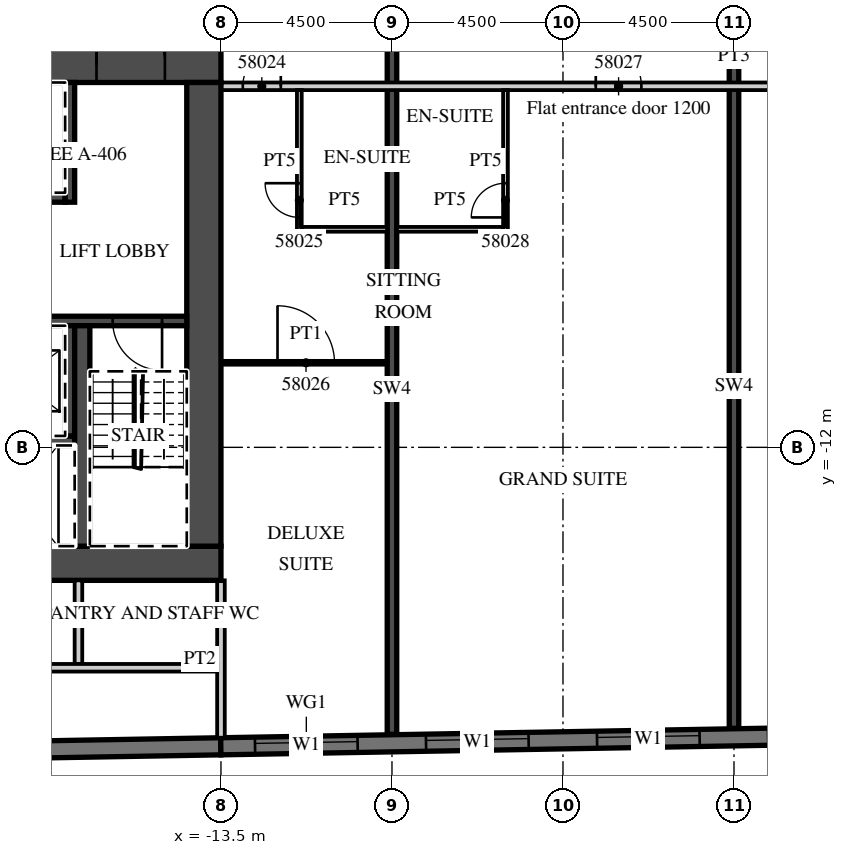
"""IFC4 building model, lengths in metres.
Left out: names, types, materials, properties, quantities, classifications, styles, units other than length and angle.
Written with IfcOpenShell. Run it as: python <this file> out.ifc"""

import sys

from ifc_helpers import new_model, si_unit, direction, frame, frame_2d, origin, place, context, subcontext, project, spatial, rectangle, extrude, element, fill, save


model = new_model("IFC4")
c1 = context("Model", 3, precision=1e-05, world=origin(), true_north=direction((0.0, 1.0)))
c2 = subcontext(c1, "Body", "Model", "MODEL_VIEW")
j1 = project(units=[si_unit("LENGTHUNIT", "METRE"), si_unit("PLANEANGLEUNIT", "RADIAN")], contexts=[c1])
p1 = place(None, origin())
s1 = spatial("IfcSite", under=j1, at=p1, CompositionType="ELEMENT")
p2 = place(p1, origin())
s2 = spatial("IfcBuilding", under=s1, at=p2, CompositionType="ELEMENT")
p3 = place(p2, frame((0.0, 0.0, 237.5)))
s3 = spatial("IfcBuildingStorey", under=s2, at=p3, CompositionType="ELEMENT", Elevation=237.5)
p4 = place(p3, frame((-9.0, -19.55, 0.0), z_axis=(0.0, 0.0, 1.0), x_axis=(0.0, 1.0, 0.0)))
e1 = element("IfcWall", 1, at=p4, inside=s3, PredefinedType="SHEAR", context=c2, shape_type="SweptSolid", body=[
    extrude(rectangle(XDim=18.15, YDim=0.25, at=frame_2d((9.075, 0.0))), origin(), (0.0, 0.0, 1.0), 3.3),
])
p5 = place(p3, frame((0.0, -19.393, 0.0), z_axis=(0.0, 0.0, 1.0), x_axis=(0.0, 1.0, 0.0)))
e2 = element("IfcWall", 2, at=p5, inside=s3, PredefinedType="SHEAR", context=c2, shape_type="SweptSolid", body=[
    extrude(rectangle(XDim=17.993, YDim=0.25, at=frame_2d((8.997, 0.0))), origin(), (0.0, 0.0, 1.0), 3.3),
])
p6 = place(p3, frame((-31.504, -20.18, 0.0), z_axis=(0.0, 0.0, 1.0), x_axis=(0.999847677887, 0.017453395744, 0.0)))
e3 = element("IfcWall", 3, at=p6, inside=s3, PredefinedType="SOLIDWALL", context=c2, shape_type="SweptSolid", body=[
    extrude(rectangle(XDim=18.003, YDim=0.45, at=frame_2d((9.001, 0.0))), origin(), (0.0, 0.0, 1.0), 3.02),
])
p7 = place(p3, frame((-13.504, -19.866, 0.0), z_axis=(0.0, 0.0, 1.0), x_axis=(0.999847672978, 0.017453676992, 0.0)))
e4 = element("IfcWall", 4, at=p7, inside=s3, PredefinedType="SOLIDWALL", context=c2, shape_type="SweptSolid", body=[
    extrude(rectangle(XDim=52.86, YDim=0.45, at=frame_2d((26.43, 0.0))), origin(), (0.0, 0.0, 1.0), 3.02),
])
p8 = place(p7, frame((0.9, 0.0, 0.45)))
e5 = element("IfcOpeningElement", 5, at=p8, cuts=e4, PredefinedType="OPENING", context=c2, shape_type="SweptSolid", body=[
    extrude(rectangle(XDim=2.7, YDim=2.25, at=frame_2d((1.35, 1.125))), frame((0.0, 0.235, 0.0), z_axis=(0.0, -1.0, 0.0), x_axis=(1.0, 0.0, 0.0)), (0.0, 0.0, 1.0), 0.47),
])
p9 = place(p7, frame((5.401, 0.0, 0.45)))
e6 = element("IfcOpeningElement", 6, at=p9, cuts=e4, PredefinedType="OPENING", context=c2, shape_type="SweptSolid", body=[
    extrude(rectangle(XDim=2.7, YDim=2.25, at=frame_2d((1.35, 1.125))), frame((0.0, 0.235, 0.0), z_axis=(0.0, -1.0, 0.0), x_axis=(1.0, 0.0, 0.0)), (0.0, 0.0, 1.0), 0.47),
])
p10 = place(p7, frame((9.902, 0.0, 0.45)))
e7 = element("IfcOpeningElement", 7, at=p10, cuts=e4, PredefinedType="OPENING", context=c2, shape_type="SweptSolid", body=[
    extrude(rectangle(XDim=2.7, YDim=2.25, at=frame_2d((1.35, 1.125))), frame((0.0, 0.235, 0.0), z_axis=(0.0, -1.0, 0.0), x_axis=(1.0, 0.0, 0.0)), (0.0, 0.0, 1.0), 0.47),
])
p11 = place(p7, frame((14.402, 0.0, 0.45)))
e8 = element("IfcOpeningElement", 8, at=p11, cuts=e4, PredefinedType="OPENING", context=c2, shape_type="SweptSolid", body=[
    extrude(rectangle(XDim=2.7, YDim=2.25, at=frame_2d((1.35, 1.125))), frame((0.0, 0.235, 0.0), z_axis=(0.0, -1.0, 0.0), x_axis=(1.0, 0.0, 0.0)), (0.0, 0.0, 1.0), 0.47),
])
p12 = place(p7, frame((18.903, 0.0, 0.45)))
e9 = element("IfcOpeningElement", 9, at=p12, cuts=e4, PredefinedType="OPENING", context=c2, shape_type="SweptSolid", body=[
    extrude(rectangle(XDim=2.7, YDim=2.25, at=frame_2d((1.35, 1.125))), frame((0.0, 0.235, 0.0), z_axis=(0.0, -1.0, 0.0), x_axis=(1.0, 0.0, 0.0)), (0.0, 0.0, 1.0), 0.47),
])
p13 = place(p7, frame((23.404, 0.0, 0.45)))
e10 = element("IfcOpeningElement", 10, at=p13, cuts=e4, PredefinedType="OPENING", context=c2, shape_type="SweptSolid", body=[
    extrude(rectangle(XDim=2.7, YDim=2.25, at=frame_2d((1.35, 1.125))), frame((0.0, 0.235, 0.0), z_axis=(0.0, -1.0, 0.0), x_axis=(1.0, 0.0, 0.0)), (0.0, 0.0, 1.0), 0.47),
])
p14 = place(p7, frame((27.904, 0.0, 0.45)))
e11 = element("IfcOpeningElement", 11, at=p14, cuts=e4, PredefinedType="OPENING", context=c2, shape_type="SweptSolid", body=[
    extrude(rectangle(XDim=2.7, YDim=2.25, at=frame_2d((1.35, 1.125))), frame((0.0, 0.235, 0.0), z_axis=(0.0, -1.0, 0.0), x_axis=(1.0, 0.0, 0.0)), (0.0, 0.0, 1.0), 0.47),
])
p15 = place(p7, frame((32.405, 0.0, 0.45)))
e12 = element("IfcOpeningElement", 12, at=p15, cuts=e4, PredefinedType="OPENING", context=c2, shape_type="SweptSolid", body=[
    extrude(rectangle(XDim=2.7, YDim=2.25, at=frame_2d((1.35, 1.125))), frame((0.0, 0.235, 0.0), z_axis=(0.0, -1.0, 0.0), x_axis=(1.0, 0.0, 0.0)), (0.0, 0.0, 1.0), 0.47),
])
p16 = place(p7, frame((36.906, 0.0, 0.45)))
e13 = element("IfcOpeningElement", 13, at=p16, cuts=e4, PredefinedType="OPENING", context=c2, shape_type="SweptSolid", body=[
    extrude(rectangle(XDim=2.7, YDim=2.25, at=frame_2d((1.35, 1.125))), frame((0.0, 0.235, 0.0), z_axis=(0.0, -1.0, 0.0), x_axis=(1.0, 0.0, 0.0)), (0.0, 0.0, 1.0), 0.47),
])
p17 = place(p7, frame((41.406, 0.0, 0.45)))
e14 = element("IfcOpeningElement", 14, at=p17, cuts=e4, PredefinedType="OPENING", context=c2, shape_type="SweptSolid", body=[
    extrude(rectangle(XDim=2.7, YDim=2.25, at=frame_2d((1.35, 1.125))), frame((0.0, 0.235, 0.0), z_axis=(0.0, -1.0, 0.0), x_axis=(1.0, 0.0, 0.0)), (0.0, 0.0, 1.0), 0.47),
])
p18 = place(p7, frame((45.907, 0.0, 0.45)))
e15 = element("IfcOpeningElement", 15, at=p18, cuts=e4, PredefinedType="OPENING", context=c2, shape_type="SweptSolid", body=[
    extrude(rectangle(XDim=2.7, YDim=2.25, at=frame_2d((1.35, 1.125))), frame((0.0, 0.235, 0.0), z_axis=(0.0, -1.0, 0.0), x_axis=(1.0, 0.0, 0.0)), (0.0, 0.0, 1.0), 0.47),
])
p19 = place(p3, frame((-13.5, -19.641, 0.0), z_axis=(0.0, 0.0, 1.0), x_axis=(0.0, 1.0, 0.0)))
e16 = element("IfcWall", 16, at=p19, inside=s3, PredefinedType="PARTITIONING", context=c2, shape_type="SweptSolid", body=[
    extrude(rectangle(XDim=4.141, YDim=0.2, at=frame_2d((2.071, 0.0))), origin(), (0.0, 0.0, 1.0), 3.02),
])
p20 = place(p3, frame((-13.5, -2.5, 0.0), z_axis=(0.0, 0.0, 1.0), x_axis=(1.0, 0.0, 0.0)))
e17 = element("IfcWall", 17, at=p20, inside=s3, PredefinedType="PARTITIONING", context=c2, shape_type="SweptSolid", body=[
    extrude(rectangle(XDim=27.0, YDim=0.2, at=frame_2d((13.5, 0.0))), origin(), (0.0, 0.0, 1.0), 3.02),
])
p21 = place(p20, frame((0.575, 0.0, 0.0)))
e18 = element("IfcOpeningElement", 18, at=p21, cuts=e17, PredefinedType="OPENING", context=c2, shape_type="SweptSolid", body=[
    extrude(rectangle(XDim=1.0, YDim=2.1, at=frame_2d((0.5, 1.05))), frame((0.0, 0.11, 0.0), z_axis=(0.0, -1.0, 0.0), x_axis=(1.0, 0.0, 0.0)), (0.0, 0.0, 1.0), 0.22),
])
p22 = place(p20, frame((9.863, 0.0, 0.0)))
e19 = element("IfcOpeningElement", 19, at=p22, cuts=e17, PredefinedType="OPENING", context=c2, shape_type="SweptSolid", body=[
    extrude(rectangle(XDim=1.2, YDim=2.1, at=frame_2d((0.6, 1.05))), frame((0.0, 0.11, 0.0), z_axis=(0.0, -1.0, 0.0), x_axis=(1.0, 0.0, 0.0)), (0.0, 0.0, 1.0), 0.22),
])
p23 = place(p20, frame((15.938, 0.0, 0.0)))
e20 = element("IfcOpeningElement", 20, at=p23, cuts=e17, PredefinedType="OPENING", context=c2, shape_type="SweptSolid", body=[
    extrude(rectangle(XDim=1.2, YDim=2.1, at=frame_2d((0.6, 1.05))), frame((0.0, 0.11, 0.0), z_axis=(0.0, -1.0, 0.0), x_axis=(1.0, 0.0, 0.0)), (0.0, 0.0, 1.0), 0.22),
])
p24 = place(p20, frame((23.075, 0.0, 0.0)))
e21 = element("IfcOpeningElement", 21, at=p24, cuts=e17, PredefinedType="OPENING", context=c2, shape_type="SweptSolid", body=[
    extrude(rectangle(XDim=1.0, YDim=2.1, at=frame_2d((0.5, 1.05))), frame((0.0, 0.11, 0.0), z_axis=(0.0, -1.0, 0.0), x_axis=(1.0, 0.0, 0.0)), (0.0, 0.0, 1.0), 0.22),
])
p25 = place(p3, frame((-11.438, -6.325, 0.0), z_axis=(0.0, 0.0, 1.0), x_axis=(0.0, 1.0, 0.0)))
e22 = element("IfcWall", 22, at=p25, inside=s3, PredefinedType="PARTITIONING", context=c2, shape_type="SweptSolid", body=[
    extrude(rectangle(XDim=3.725, YDim=0.125, at=frame_2d((1.862, 0.0))), origin(), (0.0, 0.0, 1.0), 3.02),
])
p26 = place(p25, frame((0.375, 0.0, 0.0)))
e23 = element("IfcOpeningElement", 23, at=p26, cuts=e22, PredefinedType="OPENING", context=c2, shape_type="SweptSolid", body=[
    extrude(rectangle(XDim=0.9, YDim=2.1, at=frame_2d((0.45, 1.05))), frame((0.0, 0.073, 0.0), z_axis=(0.0, -1.0, 0.0), x_axis=(1.0, 0.0, 0.0)), (0.0, 0.0, 1.0), 0.145),
])
p27 = place(p3, frame((-11.375, -6.263, 0.0), z_axis=(0.0, 0.0, 1.0), x_axis=(1.0, 0.0, 0.0)))
e24 = element("IfcWall", 24, at=p27, inside=s3, PredefinedType="PARTITIONING", context=c2, shape_type="SweptSolid", body=[
    extrude(rectangle(XDim=2.25, YDim=0.125, at=frame_2d((1.125, 0.0))), origin(), (0.0, 0.0, 1.0), 3.02),
])
p28 = place(p3, frame((-13.4, -9.775, 0.0), z_axis=(0.0, 0.0, 1.0), x_axis=(1.0, 0.0, 0.0)))
e25 = element("IfcWall", 25, at=p28, inside=s3, PredefinedType="PARTITIONING", context=c2, shape_type="SweptSolid", body=[
    extrude(rectangle(XDim=4.275, YDim=0.1, at=frame_2d((2.137, 0.0))), origin(), (0.0, 0.0, 1.0), 3.02),
])
p29 = place(p28, frame((1.388, 0.0, 0.0)))
e26 = element("IfcOpeningElement", 26, at=p29, cuts=e25, PredefinedType="OPENING", context=c2, shape_type="SweptSolid", body=[
    extrude(rectangle(XDim=1.5, YDim=2.1, at=frame_2d((0.75, 1.05))), frame((0.0, 0.06, 0.0), z_axis=(0.0, -1.0, 0.0), x_axis=(1.0, 0.0, 0.0)), (0.0, 0.0, 1.0), 0.12),
])
p30 = place(p3, frame((-6.013, -6.325, 0.0), z_axis=(0.0, 0.0, 1.0), x_axis=(0.0, 1.0, 0.0)))
e27 = element("IfcWall", 27, at=p30, inside=s3, PredefinedType="PARTITIONING", context=c2, shape_type="SweptSolid", body=[
    extrude(rectangle(XDim=3.725, YDim=0.125, at=frame_2d((1.862, 0.0))), origin(), (0.0, 0.0, 1.0), 3.02),
])
p31 = place(p30, frame((0.375, 0.0, 0.0)))
e28 = element("IfcOpeningElement", 28, at=p31, cuts=e27, PredefinedType="OPENING", context=c2, shape_type="SweptSolid", body=[
    extrude(rectangle(XDim=0.9, YDim=2.1, at=frame_2d((0.45, 1.05))), frame((0.0, 0.073, 0.0), z_axis=(0.0, -1.0, 0.0), x_axis=(1.0, 0.0, 0.0)), (0.0, 0.0, 1.0), 0.145),
])
p32 = place(p3, frame((-8.875, -6.263, 0.0), z_axis=(0.0, 0.0, 1.0), x_axis=(1.0, 0.0, 0.0)))
e29 = element("IfcWall", 29, at=p32, inside=s3, PredefinedType="PARTITIONING", context=c2, shape_type="SweptSolid", body=[
    extrude(rectangle(XDim=2.8, YDim=0.125, at=frame_2d((1.4, 0.0))), origin(), (0.0, 0.0, 1.0), 3.02),
])
p33 = place(p3, frame((-31.5, -1.95, 0.0), z_axis=(0.0, 0.0, 1.0), x_axis=(1.0, 0.0, 0.0)))
e30 = element("IfcWall", 30, at=p33, inside=s3, PredefinedType="SHEAR", context=c2, shape_type="SweptSolid", body=[
    extrude(rectangle(XDim=18.0, YDim=0.9, at=frame_2d((9.0, 0.0))), origin(), (0.0, 0.0, 1.0), 3.02),
])
p34 = place(p33, frame((14.725, 0.0, 0.0)))
e31 = element("IfcOpeningElement", 31, at=p34, cuts=e30, PredefinedType="OPENING", context=c2, shape_type="SweptSolid", body=[
    extrude(rectangle(XDim=1.8, YDim=2.1, at=frame_2d((0.9, 1.05))), frame((0.0, 0.46, 0.0), z_axis=(0.0, -1.0, 0.0), x_axis=(1.0, 0.0, 0.0)), (0.0, 0.0, 1.0), 0.92),
])
p35 = place(p3, frame((-20.3, -15.05, 0.0), z_axis=(0.0, 0.0, 1.0), x_axis=(1.0, 0.0, 0.0)))
e32 = element("IfcWall", 32, at=p35, inside=s3, PredefinedType="SHEAR", context=c2, shape_type="SweptSolid", body=[
    extrude(rectangle(XDim=6.8, YDim=0.9, at=frame_2d((3.4, 0.0))), origin(), (0.0, 0.0, 1.0), 3.02),
])
p36 = place(p35, frame((0.875, 0.0, 0.0)))
e33 = element("IfcOpeningElement", 33, at=p36, cuts=e32, PredefinedType="OPENING", context=c2, shape_type="SweptSolid", body=[
    extrude(rectangle(XDim=1.2, YDim=2.1, at=frame_2d((0.6, 1.05))), frame((0.0, 0.46, 0.0), z_axis=(0.0, -1.0, 0.0), x_axis=(1.0, 0.0, 0.0)), (0.0, 0.0, 1.0), 0.92),
])
p37 = place(p3, frame((-13.95, -14.6, 0.0), z_axis=(0.0, 0.0, 1.0), x_axis=(0.0, 1.0, 0.0)))
e34 = element("IfcWall", 34, at=p37, inside=s3, PredefinedType="SHEAR", context=c2, shape_type="SweptSolid", body=[
    extrude(rectangle(XDim=12.2, YDim=0.9, at=frame_2d((6.1, 0.0))), origin(), (0.0, 0.0, 1.0), 3.02),
])
p38 = place(p3, frame((-30.6, -5.425, 0.0), z_axis=(0.0, 0.0, 1.0), x_axis=(1.0, 0.0, 0.0)))
e35 = element("IfcWall", 35, at=p38, inside=s3, PredefinedType="SHEAR", context=c2, shape_type="SweptSolid", body=[
    extrude(rectangle(XDim=13.0, YDim=0.25, at=frame_2d((6.5, 0.0))), origin(), (0.0, 0.0, 1.0), 3.02),
])
p39 = place(p38, frame((3.325, 0.0, 0.0)))
e36 = element("IfcOpeningElement", 36, at=p39, cuts=e35, PredefinedType="OPENING", context=c2, shape_type="SweptSolid", body=[
    extrude(rectangle(XDim=1.2, YDim=2.1, at=frame_2d((0.6, 1.05))), frame((0.0, 0.135, 0.0), z_axis=(0.0, -1.0, 0.0), x_axis=(1.0, 0.0, 0.0)), (0.0, 0.0, 1.0), 0.27),
])
p40 = place(p38, frame((5.925, 0.0, 0.0)))
e37 = element("IfcOpeningElement", 37, at=p40, cuts=e35, PredefinedType="OPENING", context=c2, shape_type="SweptSolid", body=[
    extrude(rectangle(XDim=1.2, YDim=2.1, at=frame_2d((0.6, 1.05))), frame((0.0, 0.135, 0.0), z_axis=(0.0, -1.0, 0.0), x_axis=(1.0, 0.0, 0.0)), (0.0, 0.0, 1.0), 0.27),
])
p41 = place(p3, frame((-17.475, -5.55, 0.0), z_axis=(0.0, 0.0, 1.0), x_axis=(0.0, 1.0, 0.0)))
e38 = element("IfcWall", 38, at=p41, inside=s3, PredefinedType="SHEAR", context=c2, shape_type="SweptSolid", body=[
    extrude(rectangle(XDim=3.15, YDim=0.25, at=frame_2d((1.575, 0.0))), origin(), (0.0, 0.0, 1.0), 3.02),
])
p42 = place(p3, frame((-30.6, -8.675, 0.0), z_axis=(0.0, 0.0, 1.0), x_axis=(1.0, 0.0, 0.0)))
e39 = element("IfcWall", 39, at=p42, inside=s3, PredefinedType="SHEAR", context=c2, shape_type="SweptSolid", body=[
    extrude(rectangle(XDim=16.2, YDim=0.25, at=frame_2d((8.1, 0.0))), origin(), (0.0, 0.0, 1.0), 3.02),
])
p43 = place(p42, frame((8.55, 0.0, 0.0)))
e40 = element("IfcOpeningElement", 40, at=p43, cuts=e39, PredefinedType="OPENING", context=c2, shape_type="SweptSolid", body=[
    extrude(rectangle(XDim=1.2, YDim=2.1, at=frame_2d((0.6, 1.05))), frame((0.0, 0.135, 0.0), z_axis=(0.0, -1.0, 0.0), x_axis=(1.0, 0.0, 0.0)), (0.0, 0.0, 1.0), 0.27),
])
p44 = place(p42, frame((11.2, 0.0, 0.0)))
e41 = element("IfcOpeningElement", 41, at=p44, cuts=e39, PredefinedType="OPENING", context=c2, shape_type="SweptSolid", body=[
    extrude(rectangle(XDim=1.2, YDim=2.1, at=frame_2d((0.6, 1.05))), frame((0.0, 0.135, 0.0), z_axis=(0.0, -1.0, 0.0), x_axis=(1.0, 0.0, 0.0)), (0.0, 0.0, 1.0), 0.27),
])
p45 = place(p42, frame((14.25, 0.0, 0.0)))
e42 = element("IfcOpeningElement", 42, at=p45, cuts=e39, PredefinedType="OPENING", context=c2, shape_type="SweptSolid", body=[
    extrude(rectangle(XDim=1.3, YDim=2.1, at=frame_2d((0.65, 1.05))), frame((0.0, 0.135, 0.0), z_axis=(0.0, -1.0, 0.0), x_axis=(1.0, 0.0, 0.0)), (0.0, 0.0, 1.0), 0.27),
])
p46 = place(p42, frame((1.637, 0.0, 0.0)))
e43 = element("IfcOpeningElement", 43, at=p46, cuts=e39, PredefinedType="OPENING", context=c2, shape_type="SweptSolid", body=[
    extrude(rectangle(XDim=1.0, YDim=2.1, at=frame_2d((0.5, 1.05))), frame((0.0, 0.135, 0.0), z_axis=(0.0, -1.0, 0.0), x_axis=(1.0, 0.0, 0.0)), (0.0, 0.0, 1.0), 0.27),
])
p47 = place(p42, frame((5.613, 0.0, 0.0)))
e44 = element("IfcOpeningElement", 44, at=p47, cuts=e39, PredefinedType="OPENING", context=c2, shape_type="SweptSolid", body=[
    extrude(rectangle(XDim=1.0, YDim=2.1, at=frame_2d((0.5, 1.05))), frame((0.0, 0.135, 0.0), z_axis=(0.0, -1.0, 0.0), x_axis=(1.0, 0.0, 0.0)), (0.0, 0.0, 1.0), 0.27),
])
p48 = place(p3, frame((-30.6, -11.825, 0.0), z_axis=(0.0, 0.0, 1.0), x_axis=(1.0, 0.0, 0.0)))
e45 = element("IfcWall", 45, at=p48, inside=s3, PredefinedType="SHEAR", context=c2, shape_type="SweptSolid", body=[
    extrude(rectangle(XDim=13.25, YDim=0.25, at=frame_2d((6.625, 0.0))), origin(), (0.0, 0.0, 1.0), 3.02),
])
p49 = place(p3, frame((-17.475, -11.7, 0.0), z_axis=(0.0, 0.0, 1.0), x_axis=(0.0, 1.0, 0.0)))
e46 = element("IfcWall", 46, at=p49, inside=s3, PredefinedType="SHEAR", context=c2, shape_type="SweptSolid", body=[
    extrude(rectangle(XDim=2.9, YDim=0.25, at=frame_2d((1.45, 0.0))), origin(), (0.0, 0.0, 1.0), 3.02),
])
p50 = place(p3, frame((-17.15, -14.6, 0.0), z_axis=(0.0, 0.0, 1.0), x_axis=(0.0, 1.0, 0.0)))
e47 = element("IfcWall", 47, at=p50, inside=s3, PredefinedType="SHEAR", context=c2, shape_type="SweptSolid", body=[
    extrude(rectangle(XDim=5.8, YDim=0.4, at=frame_2d((2.9, 0.0))), origin(), (0.0, 0.0, 1.0), 3.02),
])
p51 = place(p3, frame((-17.25, -17.7, 0.0), z_axis=(0.0, 0.0, 1.0), x_axis=(0.0, 1.0, 0.0)))
e48 = element("IfcWall", 48, at=p51, inside=s3, PredefinedType="PARTITIONING", context=c2, shape_type="SweptSolid", body=[
    extrude(rectangle(XDim=2.2, YDim=0.2, at=frame_2d((1.1, 0.0))), origin(), (0.0, 0.0, 1.0), 3.02),
])
p52 = place(p3, frame((-35.864, -17.8, 0.0), z_axis=(0.0, 0.0, 1.0), x_axis=(1.0, 0.0, 0.0)))
e49 = element("IfcWall", 49, at=p52, inside=s3, PredefinedType="PARTITIONING", context=c2, shape_type="SweptSolid", body=[
    extrude(rectangle(XDim=22.264, YDim=0.2, at=frame_2d((11.132, 0.0))), origin(), (0.0, 0.0, 1.0), 3.02),
])
p53 = place(p52, frame((6.351, 0.0, 0.0)))
e50 = element("IfcOpeningElement", 50, at=p53, cuts=e49, PredefinedType="OPENING", context=c2, shape_type="SweptSolid", body=[
    extrude(rectangle(XDim=0.9, YDim=2.1, at=frame_2d((0.45, 1.05))), frame((0.0, 0.11, 0.0), z_axis=(0.0, -1.0, 0.0), x_axis=(1.0, 0.0, 0.0)), (0.0, 0.0, 1.0), 0.22),
])
p54 = place(p52, frame((14.651, 0.0, 0.0)))
e51 = element("IfcOpeningElement", 51, at=p54, cuts=e49, PredefinedType="OPENING", context=c2, shape_type="SweptSolid", body=[
    extrude(rectangle(XDim=0.9, YDim=2.1, at=frame_2d((0.45, 1.05))), frame((0.0, 0.11, 0.0), z_axis=(0.0, -1.0, 0.0), x_axis=(1.0, 0.0, 0.0)), (0.0, 0.0, 1.0), 0.22),
])
p55 = place(p8, origin())
e52 = element("IfcWindow", 52, at=p55, inside=s3, PartitioningType="SINGLE_PANEL", PredefinedType="WINDOW", context=c2, shape_type="SweptSolid", body=[
    extrude(rectangle(XDim=2.7, YDim=2.25, at=frame_2d((1.35, 1.125))), frame((0.0, 0.09, 0.0), z_axis=(0.0, -1.0, 0.0), x_axis=(1.0, 0.0, 0.0)), (0.0, 0.0, 1.0), 0.06),
])
fill(e5, e52)
p56 = place(p9, origin())
e53 = element("IfcWindow", 53, at=p56, inside=s3, PartitioningType="SINGLE_PANEL", PredefinedType="WINDOW", context=c2, shape_type="SweptSolid", body=[
    extrude(rectangle(XDim=2.7, YDim=2.25, at=frame_2d((1.35, 1.125))), frame((0.0, 0.09, 0.0), z_axis=(0.0, -1.0, 0.0), x_axis=(1.0, 0.0, 0.0)), (0.0, 0.0, 1.0), 0.06),
])
fill(e6, e53)
p57 = place(p10, origin())
e54 = element("IfcWindow", 54, at=p57, inside=s3, PartitioningType="SINGLE_PANEL", PredefinedType="WINDOW", context=c2, shape_type="SweptSolid", body=[
    extrude(rectangle(XDim=2.7, YDim=2.25, at=frame_2d((1.35, 1.125))), frame((0.0, 0.09, 0.0), z_axis=(0.0, -1.0, 0.0), x_axis=(1.0, 0.0, 0.0)), (0.0, 0.0, 1.0), 0.06),
])
fill(e7, e54)
p58 = place(p21, origin())
e55 = element("IfcDoor", 55, at=p58, inside=s3, OperationType="SINGLE_SWING_RIGHT", PredefinedType="DOOR", context=c2, shape_type="SweptSolid", body=[
    extrude(rectangle(XDim=1.0, YDim=2.1, at=frame_2d((0.5, 1.05))), frame((0.0, 0.025, 0.0), z_axis=(0.0, -1.0, 0.0), x_axis=(1.0, 0.0, 0.0)), (0.0, 0.0, 1.0), 0.05),
])
fill(e18, e55)
p59 = place(p26, origin())
e56 = element("IfcDoor", 56, at=p59, inside=s3, OperationType="SINGLE_SWING_RIGHT", PredefinedType="DOOR", context=c2, shape_type="SweptSolid", body=[
    extrude(rectangle(XDim=0.9, YDim=2.1, at=frame_2d((0.45, 1.05))), frame((0.0, 0.025, 0.0), z_axis=(0.0, -1.0, 0.0), x_axis=(1.0, 0.0, 0.0)), (0.0, 0.0, 1.0), 0.05),
])
fill(e23, e56)
p60 = place(p29, origin())
e57 = element("IfcDoor", 57, at=p60, inside=s3, OperationType="SINGLE_SWING_LEFT", PredefinedType="DOOR", context=c2, shape_type="SweptSolid", body=[
    extrude(rectangle(XDim=1.5, YDim=2.1, at=frame_2d((0.75, 1.05))), frame((0.0, 0.025, 0.0), z_axis=(0.0, -1.0, 0.0), x_axis=(1.0, 0.0, 0.0)), (0.0, 0.0, 1.0), 0.05),
])
fill(e26, e57)
p61 = place(p22, origin())
e58 = element("IfcDoor", 58, at=p61, inside=s3, OperationType="SINGLE_SWING_LEFT", PredefinedType="DOOR", context=c2, shape_type="SweptSolid", body=[
    extrude(rectangle(XDim=1.2, YDim=2.1, at=frame_2d((0.6, 1.05))), frame((0.0, 0.025, 0.0), z_axis=(0.0, -1.0, 0.0), x_axis=(1.0, 0.0, 0.0)), (0.0, 0.0, 1.0), 0.05),
])
fill(e19, e58)
p62 = place(p31, origin())
e59 = element("IfcDoor", 59, at=p62, inside=s3, OperationType="SINGLE_SWING_LEFT", PredefinedType="DOOR", context=c2, shape_type="SweptSolid", body=[
    extrude(rectangle(XDim=0.9, YDim=2.1, at=frame_2d((0.45, 1.05))), frame((0.0, 0.025, 0.0), z_axis=(0.0, -1.0, 0.0), x_axis=(1.0, 0.0, 0.0)), (0.0, 0.0, 1.0), 0.05),
])
fill(e28, e59)
p63 = place(p34, origin())
e60 = element("IfcDoor", 60, at=p63, inside=s3, OperationType="DOUBLE_DOOR_DOUBLE_SWING", PredefinedType="DOOR", context=c2, shape_type="SweptSolid", body=[
    extrude(rectangle(XDim=1.8, YDim=2.1, at=frame_2d((0.9, 1.05))), frame((0.0, 0.025, 0.0), z_axis=(0.0, -1.0, 0.0), x_axis=(1.0, 0.0, 0.0)), (0.0, 0.0, 1.0), 0.05),
])
fill(e31, e60)
p64 = place(p45, origin())
e61 = element("IfcDoor", 61, at=p64, inside=s3, OperationType="SINGLE_SWING_RIGHT", PredefinedType="DOOR", context=c2, shape_type="SweptSolid", body=[
    extrude(rectangle(XDim=1.3, YDim=2.1, at=frame_2d((0.65, 1.05))), frame((0.0, 0.025, 0.0), z_axis=(0.0, -1.0, 0.0), x_axis=(1.0, 0.0, 0.0)), (0.0, 0.0, 1.0), 0.05),
])
fill(e42, e61)
save(model, sys.argv[1])
